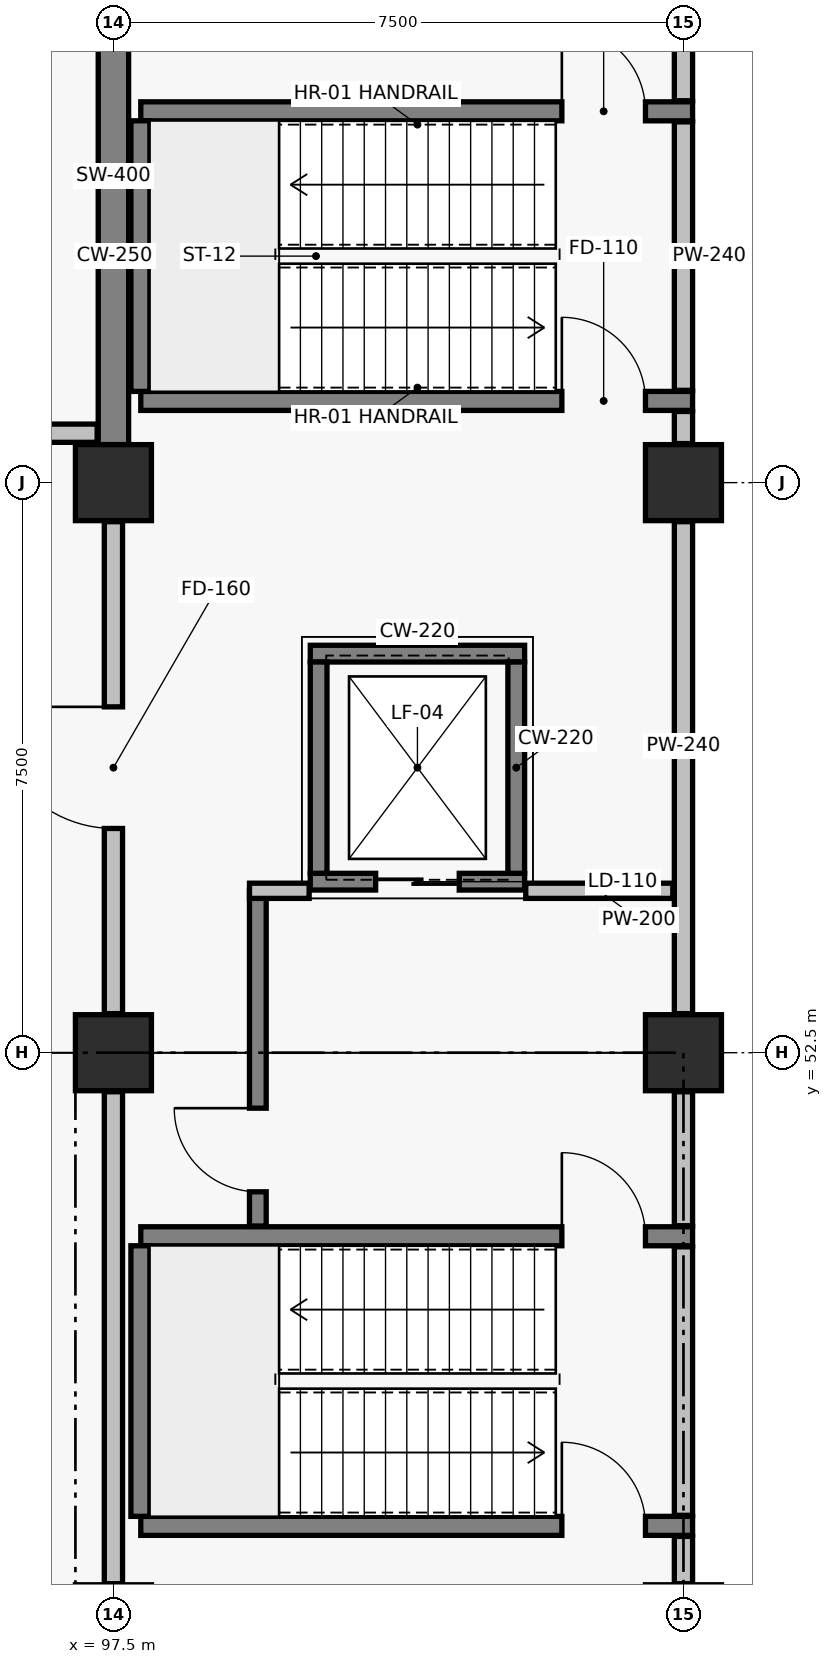
"""IFC4 building model, lengths in metres.
Left out: names, types, materials, properties, quantities, classifications, styles, units other than length and angle.
Written with IfcOpenShell. Run it as: python <this file> out.ifc"""

import sys

from ifc_helpers import new_model, si_unit, direction, frame, frame_2d, origin, origin_2d, place, context, subcontext, project, spatial, rectangle, extrude, element, fill, save


model = new_model("IFC4")
c1 = context("Model", 3, precision=1e-05, world=origin(), true_north=direction((0.0, 1.0)))
c2 = subcontext(c1, "Body", "Model", "MODEL_VIEW")
j1 = project(units=[si_unit("LENGTHUNIT", "METRE"), si_unit("PLANEANGLEUNIT", "RADIAN")], contexts=[c1])
p1 = place(None, origin())
s1 = spatial("IfcSite", under=j1, at=p1, CompositionType="ELEMENT")
p2 = place(p1, origin())
s2 = spatial("IfcBuilding", under=s1, at=p2, CompositionType="ELEMENT")
p3 = place(p2, frame((0.0, 0.0, -4.8)))
s3 = spatial("IfcBuildingStorey", under=s2, at=p3, CompositionType="ELEMENT", Elevation=-4.8)
for number, where, z_axis, x_axis in (
    (1, (97.5, 52.5, 0.0), (0.0, 0.0, 1.0), (1.0, 0.0, 0.0)),
    (2, (97.5, 60.0, 0.0), (0.0, 0.0, 1.0), (1.0, 0.0, 0.0)),
    (3, (105.0, 52.5, 0.0), (0.0, 0.0, 1.0), (1.0, 0.0, 0.0)),
    (4, (105.0, 60.0, 0.0), (0.0, 0.0, 1.0), (1.0, 0.0, 0.0)),
):
    element("IfcColumn", number, at=place(p3, frame(where, z_axis=z_axis, x_axis=x_axis)), inside=s3, PredefinedType="COLUMN", context=c2, shape_type="SweptSolid", body=[
        extrude(rectangle(XDim=1.0, YDim=1.0, at=origin_2d()), origin(), (0.0, 0.0, 1.0), 4.8),
    ])
p4 = place(p3, frame((97.5, 60.5, 0.0), z_axis=(0.0, 0.0, 1.0), x_axis=(0.0, 1.0, 0.0)))
e5 = element("IfcWall", 5, at=p4, inside=s3, PredefinedType="SHEAR", context=c2, shape_type="SweptSolid", body=[
    extrude(rectangle(XDim=6.5, YDim=0.4, at=frame_2d((3.25, 0.0))), origin(), (0.0, 0.0, 1.0), 3.55),
])
p5 = place(p3, frame((97.86, 46.275, 0.0), z_axis=(0.0, 0.0, 1.0), x_axis=(1.0, 0.0, 0.0)))
e6 = element("IfcWall", 6, at=p5, inside=s3, PredefinedType="SOLIDWALL", context=c2, shape_type="SweptSolid", body=[
    extrude(rectangle(XDim=7.26, YDim=0.25, at=frame_2d((3.63, 0.0))), origin(), (0.0, 0.0, 1.0), 4.5),
])
p6 = place(p5, frame((5.54, 0.0, 0.0)))
e7 = element("IfcOpeningElement", 7, at=p6, cuts=e6, PredefinedType="OPENING", context=c2, shape_type="SweptSolid", body=[
    extrude(rectangle(XDim=1.1, YDim=2.15, at=frame_2d((0.55, 1.075))), frame((0.0, 0.135, 0.0), z_axis=(0.0, -1.0, 0.0), x_axis=(1.0, 0.0, 0.0)), (0.0, 0.0, 1.0), 0.27),
])
p7 = place(p3, frame((97.86, 50.085, 0.0), z_axis=(0.0, 0.0, 1.0), x_axis=(1.0, 0.0, 0.0)))
e8 = element("IfcWall", 8, at=p7, inside=s3, PredefinedType="SOLIDWALL", context=c2, shape_type="SweptSolid", body=[
    extrude(rectangle(XDim=7.26, YDim=0.25, at=frame_2d((3.63, 0.0))), origin(), (0.0, 0.0, 1.0), 4.5),
])
p8 = place(p7, frame((5.54, 0.0, 0.0)))
e9 = element("IfcOpeningElement", 9, at=p8, cuts=e8, PredefinedType="OPENING", context=c2, shape_type="SweptSolid", body=[
    extrude(rectangle(XDim=1.1, YDim=2.15, at=frame_2d((0.55, 1.075))), frame((0.0, 0.135, 0.0), z_axis=(0.0, -1.0, 0.0), x_axis=(1.0, 0.0, 0.0)), (0.0, 0.0, 1.0), 0.27),
])
p9 = place(p3, frame((97.855, 46.4, 0.0), z_axis=(0.0, 0.0, 1.0), x_axis=(0.0, 1.0, 0.0)))
e10 = element("IfcWall", 10, at=p9, inside=s3, PredefinedType="SOLIDWALL", context=c2, shape_type="SweptSolid", body=[
    extrude(rectangle(XDim=3.56, YDim=0.25, at=frame_2d((1.78, 0.0))), origin(), (0.0, 0.0, 1.0), 4.5),
])
p10 = place(p3, frame((97.86, 61.075, 0.0), z_axis=(0.0, 0.0, 1.0), x_axis=(1.0, 0.0, 0.0)))
e11 = element("IfcWall", 11, at=p10, inside=s3, PredefinedType="SOLIDWALL", context=c2, shape_type="SweptSolid", body=[
    extrude(rectangle(XDim=7.26, YDim=0.25, at=frame_2d((3.63, 0.0))), origin(), (0.0, 0.0, 1.0), 4.5),
])
p11 = place(p10, frame((5.54, 0.0, 0.0)))
e12 = element("IfcOpeningElement", 12, at=p11, cuts=e11, PredefinedType="OPENING", context=c2, shape_type="SweptSolid", body=[
    extrude(rectangle(XDim=1.1, YDim=2.15, at=frame_2d((0.55, 1.075))), frame((0.0, 0.135, 0.0), z_axis=(0.0, -1.0, 0.0), x_axis=(1.0, 0.0, 0.0)), (0.0, 0.0, 1.0), 0.27),
])
p12 = place(p3, frame((97.86, 64.885, 0.0), z_axis=(0.0, 0.0, 1.0), x_axis=(1.0, 0.0, 0.0)))
e13 = element("IfcWall", 13, at=p12, inside=s3, PredefinedType="SOLIDWALL", context=c2, shape_type="SweptSolid", body=[
    extrude(rectangle(XDim=7.26, YDim=0.25, at=frame_2d((3.63, 0.0))), origin(), (0.0, 0.0, 1.0), 4.5),
])
p13 = place(p12, frame((5.54, 0.0, 0.0)))
e14 = element("IfcOpeningElement", 14, at=p13, cuts=e13, PredefinedType="OPENING", context=c2, shape_type="SweptSolid", body=[
    extrude(rectangle(XDim=1.1, YDim=2.15, at=frame_2d((0.55, 1.075))), frame((0.0, 0.135, 0.0), z_axis=(0.0, -1.0, 0.0), x_axis=(1.0, 0.0, 0.0)), (0.0, 0.0, 1.0), 0.27),
])
p14 = place(p3, frame((97.855, 61.2, 0.0), z_axis=(0.0, 0.0, 1.0), x_axis=(0.0, 1.0, 0.0)))
e15 = element("IfcWall", 15, at=p14, inside=s3, PredefinedType="SOLIDWALL", context=c2, shape_type="SweptSolid", body=[
    extrude(rectangle(XDim=3.56, YDim=0.25, at=frame_2d((1.78, 0.0))), origin(), (0.0, 0.0, 1.0), 4.5),
])
p15 = place(p3, frame((100.09, 54.75, 0.0), z_axis=(0.0, 0.0, 1.0), x_axis=(1.0, 0.0, 0.0)))
e16 = element("IfcWall", 16, at=p15, inside=s3, PredefinedType="SOLIDWALL", context=c2, shape_type="SweptSolid", body=[
    extrude(rectangle(XDim=2.82, YDim=0.22, at=frame_2d((1.41, 0.0))), origin(), (0.0, 0.0, 1.0), 4.5),
])
p16 = place(p15, frame((0.86, 0.0, 0.0)))
e17 = element("IfcOpeningElement", 17, at=p16, cuts=e16, PredefinedType="OPENING", context=c2, shape_type="SweptSolid", body=[
    extrude(rectangle(XDim=1.1, YDim=2.15, at=frame_2d((0.55, 1.075))), frame((0.0, 0.12, 0.0), z_axis=(0.0, -1.0, 0.0), x_axis=(1.0, 0.0, 0.0)), (0.0, 0.0, 1.0), 0.24),
])
p17 = place(p3, frame((100.09, 57.75, 0.0), z_axis=(0.0, 0.0, 1.0), x_axis=(1.0, 0.0, 0.0)))
e18 = element("IfcWall", 18, at=p17, inside=s3, PredefinedType="SOLIDWALL", context=c2, shape_type="SweptSolid", body=[
    extrude(rectangle(XDim=2.82, YDim=0.22, at=frame_2d((1.41, 0.0))), origin(), (0.0, 0.0, 1.0), 4.5),
])
for number, where, z_axis, x_axis in (
    (19, (100.2, 54.86, 0.0), (0.0, 0.0, 1.0), (0.0, 1.0, 0.0)),
    (20, (102.8, 54.86, 0.0), (0.0, 0.0, 1.0), (0.0, 1.0, 0.0)),
):
    element("IfcWall", number, at=place(p3, frame(where, z_axis=z_axis, x_axis=x_axis)), inside=s3, PredefinedType="SOLIDWALL", context=c2, shape_type="SweptSolid", body=[
        extrude(rectangle(XDim=2.78, YDim=0.22, at=frame_2d((1.39, 0.0))), origin(), (0.0, 0.0, 1.0), 4.5),
    ])
p18 = place(p3, frame((99.4, 50.22, 0.0), z_axis=(0.0, 0.0, 1.0), x_axis=(0.0, 1.0, 0.0)))
e21 = element("IfcWall", 21, at=p18, inside=s3, PredefinedType="SOLIDWALL", context=c2, shape_type="SweptSolid", body=[
    extrude(rectangle(XDim=4.41, YDim=0.22, at=frame_2d((2.205, 0.0))), origin(), (0.0, 0.0, 1.0), 4.5),
])
p19 = place(p18, frame((0.45, 0.0, 0.0)))
e22 = element("IfcOpeningElement", 22, at=p19, cuts=e21, PredefinedType="OPENING", context=c2, shape_type="SweptSolid", body=[
    extrude(rectangle(XDim=1.1, YDim=2.15, at=frame_2d((0.55, 1.075))), frame((0.0, 0.12, 0.0), z_axis=(0.0, -1.0, 0.0), x_axis=(1.0, 0.0, 0.0)), (0.0, 0.0, 1.0), 0.24),
])
p20 = place(p3, frame((99.29, 54.63, 0.0), z_axis=(0.0, 0.0, 1.0), x_axis=(1.0, 0.0, 0.0)))
e23 = element("IfcWall", 23, at=p20, inside=s3, PredefinedType="PARTITIONING", context=c2, shape_type="SweptSolid", body=[
    extrude(rectangle(XDim=0.785, YDim=0.2, at=frame_2d((0.393, 0.0))), origin(), (0.0, 0.0, 1.0), 4.48),
])
p21 = place(p3, frame((102.925, 54.63, 0.0), z_axis=(0.0, 0.0, 1.0), x_axis=(1.0, 0.0, 0.0)))
e24 = element("IfcWall", 24, at=p21, inside=s3, PredefinedType="PARTITIONING", context=c2, shape_type="SweptSolid", body=[
    extrude(rectangle(XDim=1.935, YDim=0.2, at=frame_2d((0.968, 0.0))), origin(), (0.0, 0.0, 1.0), 4.48),
])
p22 = place(p3, frame((105.0, 45.514, 0.0), z_axis=(0.0, 0.0, 1.0), x_axis=(0.0, 1.0, 0.0)))
e25 = element("IfcWall", 25, at=p22, inside=s3, PredefinedType="PARTITIONING", context=c2, shape_type="SweptSolid", body=[
    extrude(rectangle(XDim=0.622, YDim=0.24, at=frame_2d((0.311, 0.0))), origin(), (0.0, 0.0, 1.0), 3.52),
])
p23 = place(p3, frame((105.0, 46.414, 0.0), z_axis=(0.0, 0.0, 1.0), x_axis=(0.0, 1.0, 0.0)))
e26 = element("IfcWall", 26, at=p23, inside=s3, PredefinedType="PARTITIONING", context=c2, shape_type="SweptSolid", body=[
    extrude(rectangle(XDim=3.532, YDim=0.24, at=frame_2d((1.766, 0.0))), origin(), (0.0, 0.0, 1.0), 3.87),
])
p24 = place(p3, frame((105.0, 50.224, 0.0), z_axis=(0.0, 0.0, 1.0), x_axis=(0.0, 1.0, 0.0)))
e27 = element("IfcWall", 27, at=p24, inside=s3, PredefinedType="PARTITIONING", context=c2, shape_type="SweptSolid", body=[
    extrude(rectangle(XDim=1.762, YDim=0.24, at=frame_2d((0.881, 0.0))), origin(), (0.0, 0.0, 1.0), 3.52),
])
p25 = place(p3, frame((105.0, 53.014, 0.0), z_axis=(0.0, 0.0, 1.0), x_axis=(0.0, 1.0, 0.0)))
e28 = element("IfcWall", 28, at=p25, inside=s3, PredefinedType="PARTITIONING", context=c2, shape_type="SweptSolid", body=[
    extrude(rectangle(XDim=6.472, YDim=0.24, at=frame_2d((3.236, 0.0))), origin(), (0.0, 0.0, 1.0), 3.52),
])
p26 = place(p3, frame((105.0, 60.514, 0.0), z_axis=(0.0, 0.0, 1.0), x_axis=(0.0, 1.0, 0.0)))
e29 = element("IfcWall", 29, at=p26, inside=s3, PredefinedType="PARTITIONING", context=c2, shape_type="SweptSolid", body=[
    extrude(rectangle(XDim=0.422, YDim=0.24, at=frame_2d((0.211, 0.0))), origin(), (0.0, 0.0, 1.0), 3.52),
])
p27 = place(p3, frame((105.0, 61.214, 0.0), z_axis=(0.0, 0.0, 1.0), x_axis=(0.0, 1.0, 0.0)))
e30 = element("IfcWall", 30, at=p27, inside=s3, PredefinedType="PARTITIONING", context=c2, shape_type="SweptSolid", body=[
    extrude(rectangle(XDim=3.532, YDim=0.24, at=frame_2d((1.766, 0.0))), origin(), (0.0, 0.0, 1.0), 3.87),
])
p28 = place(p3, frame((105.0, 65.024, 0.0), z_axis=(0.0, 0.0, 1.0), x_axis=(0.0, 1.0, 0.0)))
e31 = element("IfcWall", 31, at=p28, inside=s3, PredefinedType="PARTITIONING", context=c2, shape_type="SweptSolid", body=[
    extrude(rectangle(XDim=1.962, YDim=0.24, at=frame_2d((0.981, 0.0))), origin(), (0.0, 0.0, 1.0), 3.52),
])
p29 = place(p3, frame((97.5, 45.514, 0.0), z_axis=(0.0, 0.0, 1.0), x_axis=(0.0, 1.0, 0.0)))
e32 = element("IfcWall", 32, at=p29, inside=s3, PredefinedType="PARTITIONING", context=c2, shape_type="SweptSolid", body=[
    extrude(rectangle(XDim=6.472, YDim=0.24, at=frame_2d((3.236, 0.0))), origin(), (0.0, 0.0, 1.0), 3.52),
])
p30 = place(p3, frame((97.5, 53.014, 0.0), z_axis=(0.0, 0.0, 1.0), x_axis=(0.0, 1.0, 0.0)))
e33 = element("IfcWall", 33, at=p30, inside=s3, PredefinedType="PARTITIONING", context=c2, shape_type="SweptSolid", body=[
    extrude(rectangle(XDim=6.472, YDim=0.24, at=frame_2d((3.236, 0.0))), origin(), (0.0, 0.0, 1.0), 3.52),
])
p31 = place(p30, frame((2.436, 0.0, 0.0)))
e34 = element("IfcOpeningElement", 34, at=p31, cuts=e33, PredefinedType="OPENING", context=c2, shape_type="SweptSolid", body=[
    extrude(rectangle(XDim=1.6, YDim=2.15, at=frame_2d((0.8, 1.075))), frame((0.0, 0.13, 0.0), z_axis=(0.0, -1.0, 0.0), x_axis=(1.0, 0.0, 0.0)), (0.0, 0.0, 1.0), 0.26),
])
p32 = place(p3, frame((60.214, 60.65, 0.0), z_axis=(0.0, 0.0, 1.0), x_axis=(1.0, 0.0, 0.0)))
e35 = element("IfcWall", 35, at=p32, inside=s3, PredefinedType="PARTITIONING", context=c2, shape_type="SweptSolid", body=[
    extrude(rectangle(XDim=37.072, YDim=0.24, at=frame_2d((18.536, 0.0))), origin(), (0.0, 0.0, 1.0), 2.67),
])
p33 = place(p6, origin())
e36 = element("IfcDoor", 36, at=p33, inside=s3, OperationType="SINGLE_SWING_LEFT", PredefinedType="DOOR", context=c2, shape_type="SweptSolid", body=[
    extrude(rectangle(XDim=1.1, YDim=2.15, at=frame_2d((0.55, 1.075))), frame((0.0, 0.025, 0.0), z_axis=(0.0, -1.0, 0.0), x_axis=(1.0, 0.0, 0.0)), (0.0, 0.0, 1.0), 0.05),
])
fill(e7, e36)
p34 = place(p8, frame((1.1, 0.0, 0.0), z_axis=(0.0, 0.0, 1.0), x_axis=(-1.0, 0.0, 0.0)))
e37 = element("IfcDoor", 37, at=p34, inside=s3, OperationType="SINGLE_SWING_RIGHT", PredefinedType="DOOR", context=c2, shape_type="SweptSolid", body=[
    extrude(rectangle(XDim=1.1, YDim=2.15, at=frame_2d((0.55, 1.075))), frame((0.0, 0.025, 0.0), z_axis=(0.0, -1.0, 0.0), x_axis=(1.0, 0.0, 0.0)), (0.0, 0.0, 1.0), 0.05),
])
fill(e9, e37)
p35 = place(p11, origin())
e38 = element("IfcDoor", 38, at=p35, inside=s3, OperationType="SINGLE_SWING_LEFT", PredefinedType="DOOR", context=c2, shape_type="SweptSolid", body=[
    extrude(rectangle(XDim=1.1, YDim=2.15, at=frame_2d((0.55, 1.075))), frame((0.0, 0.025, 0.0), z_axis=(0.0, -1.0, 0.0), x_axis=(1.0, 0.0, 0.0)), (0.0, 0.0, 1.0), 0.05),
])
fill(e12, e38)
p36 = place(p13, frame((1.1, 0.0, 0.0), z_axis=(0.0, 0.0, 1.0), x_axis=(-1.0, 0.0, 0.0)))
e39 = element("IfcDoor", 39, at=p36, inside=s3, OperationType="SINGLE_SWING_RIGHT", PredefinedType="DOOR", context=c2, shape_type="SweptSolid", body=[
    extrude(rectangle(XDim=1.1, YDim=2.15, at=frame_2d((0.55, 1.075))), frame((0.0, 0.025, 0.0), z_axis=(0.0, -1.0, 0.0), x_axis=(1.0, 0.0, 0.0)), (0.0, 0.0, 1.0), 0.05),
])
fill(e14, e39)
p37 = place(p16, origin())
e40 = element("IfcDoor", 40, at=p37, inside=s3, OperationType="SLIDING_TO_LEFT", PredefinedType="DOOR", context=c2, shape_type="SweptSolid", body=[
    extrude(rectangle(XDim=1.1, YDim=2.15, at=frame_2d((0.55, 1.075))), frame((0.0, 0.025, 0.0), z_axis=(0.0, -1.0, 0.0), x_axis=(1.0, 0.0, 0.0)), (0.0, 0.0, 1.0), 0.05),
])
fill(e17, e40)
p38 = place(p19, origin())
e41 = element("IfcDoor", 41, at=p38, inside=s3, OperationType="SINGLE_SWING_RIGHT", PredefinedType="DOOR", context=c2, shape_type="SweptSolid", body=[
    extrude(rectangle(XDim=1.1, YDim=2.15, at=frame_2d((0.55, 1.075))), frame((0.0, 0.025, 0.0), z_axis=(0.0, -1.0, 0.0), x_axis=(1.0, 0.0, 0.0)), (0.0, 0.0, 1.0), 0.05),
])
fill(e22, e41)
p39 = place(p31, origin())
e42 = element("IfcDoor", 42, at=p39, inside=s3, OperationType="SINGLE_SWING_RIGHT", PredefinedType="DOOR", context=c2, shape_type="SweptSolid", body=[
    extrude(rectangle(XDim=1.6, YDim=2.15, at=frame_2d((0.8, 1.075))), frame((0.0, 0.025, 0.0), z_axis=(0.0, -1.0, 0.0), x_axis=(1.0, 0.0, 0.0)), (0.0, 0.0, 1.0), 0.05),
])
fill(e34, e42)
save(model, sys.argv[1])
